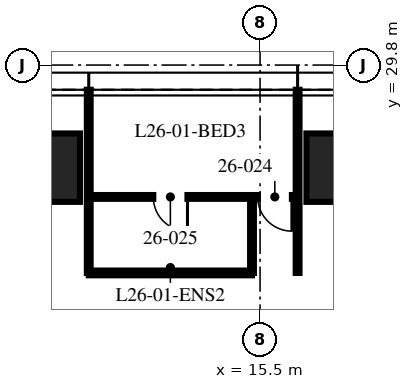
"""IFC4 building model, lengths in metres.
Left out: names, types, materials, properties, quantities, classifications, styles, units other than length and angle.
Written with IfcOpenShell. Run it as: python <this file> out.ifc"""

import sys

from ifc_helpers import new_model, si_unit, direction, frame, frame_2d, origin, origin_2d, place, context, subcontext, project, spatial, rectangle, hollow_rectangle, extrude, element, fill, save


model = new_model("IFC4")
c1 = context("Model", 3, precision=1e-05, world=origin(), true_north=direction((0.0, 1.0)))
c2 = subcontext(c1, "Body", "Model", "MODEL_VIEW")
j1 = project(units=[si_unit("LENGTHUNIT", "METRE"), si_unit("PLANEANGLEUNIT", "RADIAN")], contexts=[c1])
p1 = place(None, origin())
s1 = spatial("IfcSite", under=j1, at=p1, CompositionType="ELEMENT")
p2 = place(p1, origin())
s2 = spatial("IfcBuilding", under=s1, at=p2, CompositionType="ELEMENT")
p3 = place(p2, frame((0.0, 0.0, 107.25)))
s3 = spatial("IfcBuildingStorey", under=s2, at=p3, CompositionType="ELEMENT", Elevation=107.25)
p4 = place(p3, frame((9.16, 27.1, -0.07), z_axis=(0.0, 0.0, 1.0), x_axis=(1.0, 0.0, 0.0)))
e1 = element("IfcColumn", 1, at=p4, inside=s3, PredefinedType="COLUMN", context=c2, shape_type="SweptSolid", body=[
    extrude(hollow_rectangle(XDim=3.2, YDim=1.8, WallThickness=0.2, at=origin_2d()), origin(), (0.0, 0.0, 1.0), 3.82),
])
p5 = place(p3, frame((18.32, 27.1, 0.08), z_axis=(0.0, 0.0, 1.0), x_axis=(1.0, 0.0, 0.0)))
e2 = element("IfcColumn", 2, at=p5, inside=s3, PredefinedType="COLUMN", context=c2, shape_type="SweptSolid", body=[
    extrude(hollow_rectangle(XDim=3.2, YDim=1.8, WallThickness=0.2, at=origin_2d()), origin(), (0.0, 0.0, 1.0), 3.67),
])
for number, where, z_axis, x_axis in (
    (3, (16.488, 24.33, 0.0), (0.0, 0.0, 1.0), (0.0, 1.0, 0.0)),
    (4, (10.992, 24.33, 0.0), (0.0, 0.0, 1.0), (0.0, 1.0, 0.0)),
):
    element("IfcWall", number, at=place(p3, frame(where, z_axis=z_axis, x_axis=x_axis)), inside=s3, PredefinedType="PARTITIONING", context=c2, shape_type="SweptSolid", body=[
        extrude(rectangle(XDim=4.82, YDim=0.1, at=frame_2d((2.41, 0.0))), origin(), (0.0, 0.0, 1.0), 2.81),
    ])
p6 = place(p3, frame((16.488, 26.33, 0.0), z_axis=(0.0, 0.0, 1.0), x_axis=(-1.0, 0.0, 0.0)))
e5 = element("IfcWall", 5, at=p6, inside=s3, PredefinedType="PARTITIONING", context=c2, shape_type="SweptSolid", body=[
    extrude(rectangle(XDim=5.496, YDim=0.1, at=frame_2d((2.748, 0.0))), origin(), (0.0, 0.0, 1.0), 2.81),
])
p7 = place(p6, frame((0.15, 0.0, 0.0)))
e6 = element("IfcOpeningElement", 6, at=p7, cuts=e5, PredefinedType="OPENING", context=c2, shape_type="SweptSolid", body=[
    extrude(rectangle(XDim=0.9, YDim=2.1, at=frame_2d((0.45, 1.05))), frame((0.0, 0.06, 0.0), z_axis=(0.0, -1.0, 0.0), x_axis=(1.0, 0.0, 0.0)), (0.0, 0.0, 1.0), 0.12),
])
p8 = place(p6, frame((2.898, 0.0, 0.0)))
e7 = element("IfcOpeningElement", 7, at=p8, cuts=e5, PredefinedType="OPENING", context=c2, shape_type="SweptSolid", body=[
    extrude(rectangle(XDim=0.9, YDim=2.1, at=frame_2d((0.45, 1.05))), frame((0.0, 0.06, 0.0), z_axis=(0.0, -1.0, 0.0), x_axis=(1.0, 0.0, 0.0)), (0.0, 0.0, 1.0), 0.12),
])
p9 = place(p3, frame((15.288, 24.33, 0.0), z_axis=(0.0, 0.0, 1.0), x_axis=(0.0, 1.0, 0.0)))
e8 = element("IfcWall", 8, at=p9, inside=s3, PredefinedType="PARTITIONING", context=c2, shape_type="SweptSolid", body=[
    extrude(rectangle(XDim=2.0, YDim=0.1, at=frame_2d((1.0, 0.0))), origin(), (0.0, 0.0, 1.0), 3.5),
])
p10 = place(p3, frame((15.288, 24.33, 0.0), z_axis=(0.0, 0.0, 1.0), x_axis=(-1.0, 0.0, 0.0)))
e9 = element("IfcWall", 9, at=p10, inside=s3, PredefinedType="PARTITIONING", context=c2, shape_type="SweptSolid", body=[
    extrude(rectangle(XDim=4.296, YDim=0.125, at=frame_2d((2.148, 0.0))), origin(), (0.0, 0.0, 1.0), 2.81),
])
p11 = place(p7, origin())
e10 = element("IfcDoor", 10, at=p11, inside=s3, OperationType="SINGLE_SWING_LEFT", PredefinedType="DOOR", context=c2, shape_type="SweptSolid", body=[
    extrude(rectangle(XDim=0.9, YDim=2.1, at=frame_2d((0.45, 1.05))), frame((0.0, 0.025, 0.0), z_axis=(0.0, -1.0, 0.0), x_axis=(1.0, 0.0, 0.0)), (0.0, 0.0, 1.0), 0.05),
])
fill(e6, e10)
p12 = place(p8, origin())
e11 = element("IfcDoor", 11, at=p12, inside=s3, OperationType="SINGLE_SWING_LEFT", PredefinedType="DOOR", context=c2, shape_type="SweptSolid", body=[
    extrude(rectangle(XDim=0.9, YDim=2.1, at=frame_2d((0.45, 1.05))), frame((0.0, 0.025, 0.0), z_axis=(0.0, -1.0, 0.0), x_axis=(1.0, 0.0, 0.0)), (0.0, 0.0, 1.0), 0.05),
])
fill(e7, e11)
save(model, sys.argv[1])
